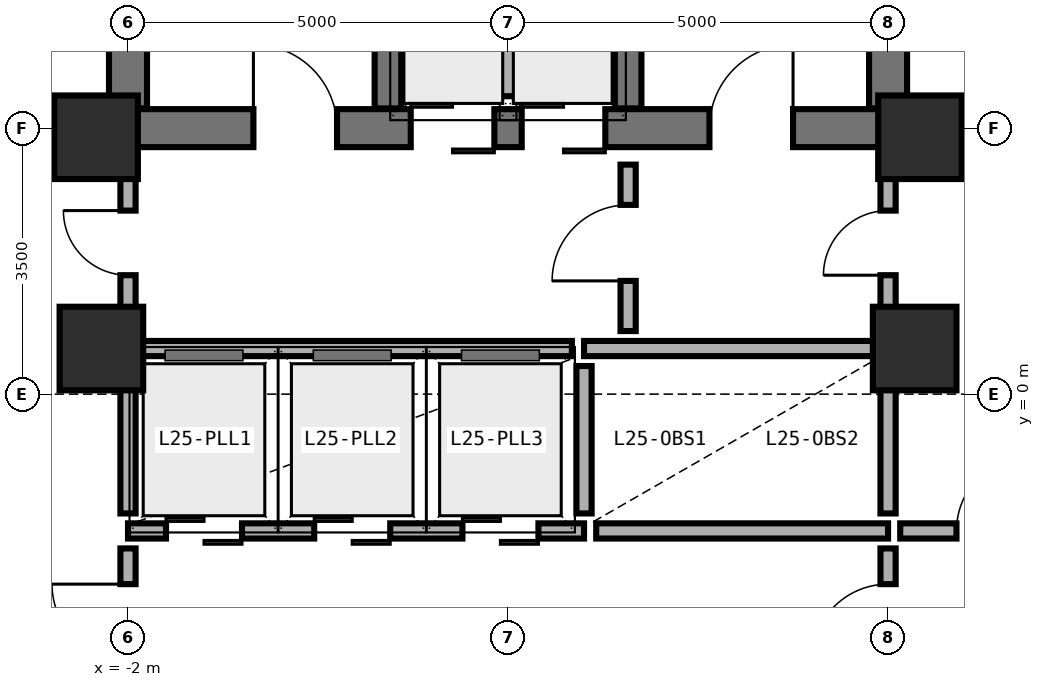
"""IFC4 building model, lengths in metres.
Left out: names, types, materials, properties, quantities, classifications, styles, units other than length and angle.
Written with IfcOpenShell. Run it as: python <this file> out.ifc"""

import sys

from ifc_helpers import new_model, si_unit, direction, frame, frame_2d, origin, origin_2d, place, context, subcontext, project, spatial, rectangle, extrude, element, fill, save


model = new_model("IFC4")
c1 = context("Model", 3, precision=1e-05, world=origin(), true_north=direction((0.0, 1.0)))
c2 = subcontext(c1, "Body", "Model", "MODEL_VIEW")
j1 = project(units=[si_unit("LENGTHUNIT", "METRE"), si_unit("PLANEANGLEUNIT", "RADIAN")], contexts=[c1])
p1 = place(None, origin())
s1 = spatial("IfcSite", under=j1, at=p1, CompositionType="ELEMENT")
p2 = place(p1, origin())
s2 = spatial("IfcBuilding", under=s1, at=p2, CompositionType="ELEMENT")
p3 = place(p2, frame((0.0, 0.0, 103.2)))
s3 = spatial("IfcBuildingStorey", under=s2, at=p3, CompositionType="ELEMENT", Elevation=103.2)
p4 = place(p3, frame((-2.0, 3.5, 0.0), z_axis=(0.0, 0.0, 1.0), x_axis=(1.0, 0.0, 0.0)))
e1 = element("IfcWall", 1, at=p4, inside=s3, PredefinedType="SHEAR", context=c2, shape_type="SweptSolid", body=[
    extrude(rectangle(XDim=10.0, YDim=0.5, at=frame_2d((5.0, 0.0))), origin(), (0.0, 0.0, 1.0), 3.892),
])
p5 = place(p4, frame((1.65, 0.0, 0.0)))
e2 = element("IfcOpeningElement", 2, at=p5, cuts=e1, PredefinedType="OPENING", context=c2, shape_type="SweptSolid", body=[
    extrude(rectangle(XDim=1.1, YDim=2.15, at=frame_2d((0.55, 1.075))), frame((0.0, 0.26, 0.0), z_axis=(0.0, -1.0, 0.0), x_axis=(1.0, 0.0, 0.0)), (0.0, 0.0, 1.0), 0.52),
])
p6 = place(p4, frame((7.65, 0.0, 0.0)))
e3 = element("IfcOpeningElement", 3, at=p6, cuts=e1, PredefinedType="OPENING", context=c2, shape_type="SweptSolid", body=[
    extrude(rectangle(XDim=1.1, YDim=2.15, at=frame_2d((0.55, 1.075))), frame((0.0, 0.26, 0.0), z_axis=(0.0, -1.0, 0.0), x_axis=(1.0, 0.0, 0.0)), (0.0, 0.0, 1.0), 0.52),
])
p7 = place(p4, frame((3.72, 0.0, 0.0)))
e4 = element("IfcOpeningElement", 4, at=p7, cuts=e1, PredefinedType="OPENING", context=c2, shape_type="SweptSolid", body=[
    extrude(rectangle(XDim=1.1, YDim=2.2, at=frame_2d((0.55, 1.1))), frame((0.0, 0.26, 0.0), z_axis=(0.0, -1.0, 0.0), x_axis=(1.0, 0.0, 0.0)), (0.0, 0.0, 1.0), 0.52),
])
p8 = place(p4, frame((5.18, 0.0, 0.0)))
e5 = element("IfcOpeningElement", 5, at=p8, cuts=e1, PredefinedType="OPENING", context=c2, shape_type="SweptSolid", body=[
    extrude(rectangle(XDim=1.1, YDim=2.2, at=frame_2d((0.55, 1.1))), frame((0.0, 0.26, 0.0), z_axis=(0.0, -1.0, 0.0), x_axis=(1.0, 0.0, 0.0)), (0.0, 0.0, 1.0), 0.52),
])
for number, where, z_axis, x_axis in (
    (6, (-2.0, 3.76, 0.0), (0.0, 0.0, 1.0), (0.0, 1.0, 0.0)),
    (7, (8.0, 3.76, 0.0), (0.0, 0.0, 1.0), (0.0, 1.0, 0.0)),
):
    element("IfcWall", number, at=place(p3, frame(where, z_axis=z_axis, x_axis=x_axis)), inside=s3, PredefinedType="SHEAR", context=c2, shape_type="SweptSolid", body=[
        extrude(rectangle(XDim=8.48, YDim=0.5, at=frame_2d((4.24, 0.0))), origin(), (0.0, 0.0, 1.0), 3.892),
    ])
for number, where, z_axis, x_axis in (
    (8, (1.42, 3.76, 0.0), (0.0, 0.0, 1.0), (0.0, 1.0, 0.0)),
    (9, (4.58, 3.76, 0.0), (0.0, 0.0, 1.0), (0.0, 1.0, 0.0)),
):
    element("IfcWall", number, at=place(p3, frame(where, z_axis=z_axis, x_axis=x_axis)), inside=s3, PredefinedType="SHEAR", context=c2, shape_type="SweptSolid", body=[
        extrude(rectangle(XDim=8.48, YDim=0.35, at=frame_2d((4.24, 0.0))), origin(), (0.0, 0.0, 1.0), 3.892),
    ])
for number, where, z_axis, x_axis in (
    (10, (-2.42, 3.38, 0.0), (0.0, 0.0, 1.0), (1.0, 0.0, 0.0)),
    (11, (8.42, 3.38, 0.0), (0.0, 0.0, 1.0), (1.0, 0.0, 0.0)),
    (12, (-2.35, 0.6, 0.0), (0.0, 0.0, 1.0), (1.0, 0.0, 0.0)),
    (13, (8.35, 0.6, 0.0), (0.0, 0.0, 1.0), (1.0, 0.0, 0.0)),
):
    element("IfcColumn", number, at=place(p3, frame(where, z_axis=z_axis, x_axis=x_axis)), inside=s3, PredefinedType="COLUMN", context=c2, shape_type="SweptSolid", body=[
        extrude(rectangle(XDim=1.1, YDim=1.1, at=origin_2d()), origin(), (0.0, 0.0, 1.0), 3.875),
    ])
p9 = place(p3, frame((3.0, 3.92, 0.0), z_axis=(0.0, 0.0, 1.0), x_axis=(0.0, 1.0, 0.0)))
e14 = element("IfcWall", 14, at=p9, inside=s3, PredefinedType="SOLIDWALL", context=c2, shape_type="SweptSolid", body=[
    extrude(rectangle(XDim=2.03, YDim=0.2, at=frame_2d((1.015, 0.0))), origin(), (0.0, 0.0, 1.0), 3.64),
])
p10 = place(p3, frame((4.0, 0.6, 0.0), z_axis=(0.0, 0.0, 1.0), x_axis=(1.0, 0.0, 0.0)))
e15 = element("IfcWall", 15, at=p10, inside=s3, PredefinedType="SOLIDWALL", context=c2, shape_type="SweptSolid", body=[
    extrude(rectangle(XDim=3.88, YDim=0.2, at=frame_2d((1.94, 0.0))), origin(), (0.0, 0.0, 1.0), 3.172),
])
p11 = place(p3, frame((-2.0, -1.8, 0.0), z_axis=(0.0, 0.0, 1.0), x_axis=(1.0, 0.0, 0.0)))
e16 = element("IfcWall", 16, at=p11, inside=s3, PredefinedType="SOLIDWALL", context=c2, shape_type="SweptSolid", body=[
    extrude(rectangle(XDim=6.0, YDim=0.2, at=frame_2d((3.0, 0.0))), origin(), (0.0, 0.0, 1.0), 3.64),
])
p12 = place(p11, frame((0.5, 0.0, 0.0)))
e17 = element("IfcOpeningElement", 17, at=p12, cuts=e16, PredefinedType="OPENING", context=c2, shape_type="SweptSolid", body=[
    extrude(rectangle(XDim=1.0, YDim=2.2, at=frame_2d((0.5, 1.1))), frame((0.0, 0.11, 0.0), z_axis=(0.0, -1.0, 0.0), x_axis=(1.0, 0.0, 0.0)), (0.0, 0.0, 1.0), 0.22),
])
p13 = place(p11, frame((2.45, 0.0, 0.0)))
e18 = element("IfcOpeningElement", 18, at=p13, cuts=e16, PredefinedType="OPENING", context=c2, shape_type="SweptSolid", body=[
    extrude(rectangle(XDim=1.0, YDim=2.2, at=frame_2d((0.5, 1.1))), frame((0.0, 0.11, 0.0), z_axis=(0.0, -1.0, 0.0), x_axis=(1.0, 0.0, 0.0)), (0.0, 0.0, 1.0), 0.22),
])
p14 = place(p11, frame((4.4, 0.0, 0.0)))
e19 = element("IfcOpeningElement", 19, at=p14, cuts=e16, PredefinedType="OPENING", context=c2, shape_type="SweptSolid", body=[
    extrude(rectangle(XDim=1.0, YDim=2.2, at=frame_2d((0.5, 1.1))), frame((0.0, 0.11, 0.0), z_axis=(0.0, -1.0, 0.0), x_axis=(1.0, 0.0, 0.0)), (0.0, 0.0, 1.0), 0.22),
])
p15 = place(p3, frame((-2.0, -1.57, 0.0), z_axis=(0.0, 0.0, 1.0), x_axis=(0.0, 1.0, 0.0)))
e20 = element("IfcWall", 20, at=p15, inside=s3, PredefinedType="SOLIDWALL", context=c2, shape_type="SweptSolid", body=[
    extrude(rectangle(XDim=2.05, YDim=0.2, at=frame_2d((1.025, 0.0))), origin(), (0.0, 0.0, 1.0), 3.022),
])
p16 = place(p3, frame((4.16, -1.8, 0.0), z_axis=(0.0, 0.0, 1.0), x_axis=(1.0, 0.0, 0.0)))
e21 = element("IfcWall", 21, at=p16, inside=s3, PredefinedType="SOLIDWALL", context=c2, shape_type="SweptSolid", body=[
    extrude(rectangle(XDim=3.84, YDim=0.2, at=frame_2d((1.92, 0.0))), origin(), (0.0, 0.0, 1.0), 3.64),
])
p17 = place(p3, frame((4.0, -1.57, 0.0), z_axis=(0.0, 0.0, 1.0), x_axis=(0.0, 1.0, 0.0)))
e22 = element("IfcWall", 22, at=p17, inside=s3, PredefinedType="SOLIDWALL", context=c2, shape_type="SweptSolid", body=[
    extrude(rectangle(XDim=1.94, YDim=0.2, at=frame_2d((0.97, 0.0))), origin(), (0.0, 0.0, 1.0), 3.64),
])
p18 = place(p3, frame((8.0, -1.57, 0.0), z_axis=(0.0, 0.0, 1.0), x_axis=(0.0, 1.0, 0.0)))
e23 = element("IfcWall", 23, at=p18, inside=s3, PredefinedType="SOLIDWALL", context=c2, shape_type="SweptSolid", body=[
    extrude(rectangle(XDim=2.05, YDim=0.2, at=frame_2d((1.025, 0.0))), origin(), (0.0, 0.0, 1.0), 3.072),
])
p19 = place(p3, frame((4.58, 0.83, 0.0), z_axis=(0.0, 0.0, 1.0), x_axis=(0.0, 1.0, 0.0)))
e24 = element("IfcWall", 24, at=p19, inside=s3, PredefinedType="MOVABLE", context=c2, shape_type="SweptSolid", body=[
    extrude(rectangle(XDim=2.19, YDim=0.2, at=frame_2d((1.095, 0.0))), origin(), (0.0, 0.0, 1.0), 3.64),
])
p20 = place(p19, frame((0.66, 0.0, 0.0)))
e25 = element("IfcOpeningElement", 25, at=p20, cuts=e24, PredefinedType="OPENING", context=c2, shape_type="SweptSolid", body=[
    extrude(rectangle(XDim=1.0, YDim=2.1, at=frame_2d((0.5, 1.05))), frame((0.0, 0.11, 0.0), z_axis=(0.0, -1.0, 0.0), x_axis=(1.0, 0.0, 0.0)), (0.0, 0.0, 1.0), 0.22),
])
p21 = place(p3, frame((-2.0, 0.72, 0.0), z_axis=(0.0, 0.0, 1.0), x_axis=(0.0, 1.0, 0.0)))
e26 = element("IfcWall", 26, at=p21, inside=s3, PredefinedType="MOVABLE", context=c2, shape_type="SweptSolid", body=[
    extrude(rectangle(XDim=2.3, YDim=0.2, at=frame_2d((1.15, 0.0))), origin(), (0.0, 0.0, 1.0), 2.872),
])
p22 = place(p21, frame((0.845, 0.0, 0.0)))
e27 = element("IfcOpeningElement", 27, at=p22, cuts=e26, PredefinedType="OPENING", context=c2, shape_type="SweptSolid", body=[
    extrude(rectangle(XDim=0.85, YDim=2.1, at=frame_2d((0.425, 1.05))), frame((0.0, 0.11, 0.0), z_axis=(0.0, -1.0, 0.0), x_axis=(1.0, 0.0, 0.0)), (0.0, 0.0, 1.0), 0.22),
])
p23 = place(p3, frame((8.0, 0.72, 0.0), z_axis=(0.0, 0.0, 1.0), x_axis=(0.0, 1.0, 0.0)))
e28 = element("IfcWall", 28, at=p23, inside=s3, PredefinedType="MOVABLE", context=c2, shape_type="SweptSolid", body=[
    extrude(rectangle(XDim=2.3, YDim=0.2, at=frame_2d((1.15, 0.0))), origin(), (0.0, 0.0, 1.0), 2.872),
])
p24 = place(p23, frame((0.845, 0.0, 0.0)))
e29 = element("IfcOpeningElement", 29, at=p24, cuts=e28, PredefinedType="OPENING", context=c2, shape_type="SweptSolid", body=[
    extrude(rectangle(XDim=0.85, YDim=2.1, at=frame_2d((0.425, 1.05))), frame((0.0, 0.11, 0.0), z_axis=(0.0, -1.0, 0.0), x_axis=(1.0, 0.0, 0.0)), (0.0, 0.0, 1.0), 0.22),
])
p25 = place(p3, frame((-2.0, -3.97, 0.0), z_axis=(0.0, 0.0, 1.0), x_axis=(0.0, 1.0, 0.0)))
e30 = element("IfcWall", 30, at=p25, inside=s3, PredefinedType="MOVABLE", context=c2, shape_type="SweptSolid", body=[
    extrude(rectangle(XDim=1.94, YDim=0.2, at=frame_2d((0.97, 0.0))), origin(), (0.0, 0.0, 1.0), 3.022),
])
p26 = place(p25, frame((0.47, 0.0, 0.0)))
e31 = element("IfcOpeningElement", 31, at=p26, cuts=e30, PredefinedType="OPENING", context=c2, shape_type="SweptSolid", body=[
    extrude(rectangle(XDim=1.0, YDim=2.1, at=frame_2d((0.5, 1.05))), frame((0.0, 0.11, 0.0), z_axis=(0.0, -1.0, 0.0), x_axis=(1.0, 0.0, 0.0)), (0.0, 0.0, 1.0), 0.22),
])
p27 = place(p3, frame((8.0, -3.97, 0.0), z_axis=(0.0, 0.0, 1.0), x_axis=(0.0, 1.0, 0.0)))
e32 = element("IfcWall", 32, at=p27, inside=s3, PredefinedType="MOVABLE", context=c2, shape_type="SweptSolid", body=[
    extrude(rectangle(XDim=1.94, YDim=0.2, at=frame_2d((0.97, 0.0))), origin(), (0.0, 0.0, 1.0), 3.072),
])
p28 = place(p27, frame((0.47, 0.0, 0.0)))
e33 = element("IfcOpeningElement", 33, at=p28, cuts=e32, PredefinedType="OPENING", context=c2, shape_type="SweptSolid", body=[
    extrude(rectangle(XDim=1.0, YDim=2.1, at=frame_2d((0.5, 1.05))), frame((0.0, 0.11, 0.0), z_axis=(0.0, -1.0, 0.0), x_axis=(1.0, 0.0, 0.0)), (0.0, 0.0, 1.0), 0.22),
])
p29 = place(p3, frame((8.16, -1.8, 0.0), z_axis=(0.0, 0.0, 1.0), x_axis=(1.0, 0.0, 0.0)))
e34 = element("IfcWall", 34, at=p29, inside=s3, PredefinedType="MOVABLE", context=c2, shape_type="SweptSolid", body=[
    extrude(rectangle(XDim=2.64, YDim=0.2, at=frame_2d((1.32, 0.0))), origin(), (0.0, 0.0, 1.0), 3.64),
])
p30 = place(p29, frame((0.74, 0.0, 0.0)))
e35 = element("IfcOpeningElement", 35, at=p30, cuts=e34, PredefinedType="OPENING", context=c2, shape_type="SweptSolid", body=[
    extrude(rectangle(XDim=1.0, YDim=2.1, at=frame_2d((0.5, 1.05))), frame((0.0, 0.11, 0.0), z_axis=(0.0, -1.0, 0.0), x_axis=(1.0, 0.0, 0.0)), (0.0, 0.0, 1.0), 0.22),
])
p31 = place(p3, frame((-1.88, 0.6, 0.0), z_axis=(0.0, 0.0, 1.0), x_axis=(1.0, 0.0, 0.0)))
e36 = element("IfcWall", 36, at=p31, inside=s3, PredefinedType="MOVABLE", context=c2, shape_type="SweptSolid", body=[
    extrude(rectangle(XDim=5.72, YDim=0.2, at=frame_2d((2.86, 0.0))), origin(), (0.0, 0.0, 1.0), 3.172),
])
p32 = place(p5, origin())
e37 = element("IfcDoor", 37, at=p32, inside=s3, OperationType="SINGLE_SWING_LEFT", PredefinedType="DOOR", context=c2, shape_type="SweptSolid", body=[
    extrude(rectangle(XDim=1.1, YDim=2.15, at=frame_2d((0.55, 1.075))), frame((0.0, 0.025, 0.0), z_axis=(0.0, -1.0, 0.0), x_axis=(1.0, 0.0, 0.0)), (0.0, 0.0, 1.0), 0.05),
])
fill(e2, e37)
p33 = place(p6, origin())
e38 = element("IfcDoor", 38, at=p33, inside=s3, OperationType="SINGLE_SWING_RIGHT", PredefinedType="DOOR", context=c2, shape_type="SweptSolid", body=[
    extrude(rectangle(XDim=1.1, YDim=2.15, at=frame_2d((0.55, 1.075))), frame((0.0, 0.025, 0.0), z_axis=(0.0, -1.0, 0.0), x_axis=(1.0, 0.0, 0.0)), (0.0, 0.0, 1.0), 0.05),
])
fill(e3, e38)
p34 = place(p7, origin())
e39 = element("IfcDoor", 39, at=p34, inside=s3, OperationType="DOUBLE_DOOR_SLIDING", PredefinedType="DOOR", context=c2, shape_type="SweptSolid", body=[
    extrude(rectangle(XDim=1.1, YDim=2.2, at=frame_2d((0.55, 1.1))), frame((0.0, 0.025, 0.0), z_axis=(0.0, -1.0, 0.0), x_axis=(1.0, 0.0, 0.0)), (0.0, 0.0, 1.0), 0.05),
])
fill(e4, e39)
p35 = place(p8, origin())
e40 = element("IfcDoor", 40, at=p35, inside=s3, OperationType="DOUBLE_DOOR_SLIDING", PredefinedType="DOOR", context=c2, shape_type="SweptSolid", body=[
    extrude(rectangle(XDim=1.1, YDim=2.2, at=frame_2d((0.55, 1.1))), frame((0.0, 0.025, 0.0), z_axis=(0.0, -1.0, 0.0), x_axis=(1.0, 0.0, 0.0)), (0.0, 0.0, 1.0), 0.05),
])
fill(e5, e40)
p36 = place(p20, origin())
e41 = element("IfcDoor", 41, at=p36, inside=s3, OperationType="SINGLE_SWING_LEFT", PredefinedType="DOOR", context=c2, shape_type="SweptSolid", body=[
    extrude(rectangle(XDim=1.0, YDim=2.1, at=frame_2d((0.5, 1.05))), frame((0.0, 0.025, 0.0), z_axis=(0.0, -1.0, 0.0), x_axis=(1.0, 0.0, 0.0)), (0.0, 0.0, 1.0), 0.05),
])
fill(e25, e41)
p37 = place(p22, origin())
e42 = element("IfcDoor", 42, at=p37, inside=s3, OperationType="SINGLE_SWING_RIGHT", PredefinedType="DOOR", context=c2, shape_type="SweptSolid", body=[
    extrude(rectangle(XDim=0.85, YDim=2.1, at=frame_2d((0.425, 1.05))), frame((0.0, 0.025, 0.0), z_axis=(0.0, -1.0, 0.0), x_axis=(1.0, 0.0, 0.0)), (0.0, 0.0, 1.0), 0.05),
])
fill(e27, e42)
p38 = place(p24, origin())
e43 = element("IfcDoor", 43, at=p38, inside=s3, OperationType="SINGLE_SWING_LEFT", PredefinedType="DOOR", context=c2, shape_type="SweptSolid", body=[
    extrude(rectangle(XDim=0.85, YDim=2.1, at=frame_2d((0.425, 1.05))), frame((0.0, 0.025, 0.0), z_axis=(0.0, -1.0, 0.0), x_axis=(1.0, 0.0, 0.0)), (0.0, 0.0, 1.0), 0.05),
])
fill(e29, e43)
p39 = place(p26, origin())
e44 = element("IfcDoor", 44, at=p39, inside=s3, OperationType="SINGLE_SWING_RIGHT", PredefinedType="DOOR", context=c2, shape_type="SweptSolid", body=[
    extrude(rectangle(XDim=1.0, YDim=2.1, at=frame_2d((0.5, 1.05))), frame((0.0, 0.025, 0.0), z_axis=(0.0, -1.0, 0.0), x_axis=(1.0, 0.0, 0.0)), (0.0, 0.0, 1.0), 0.05),
])
fill(e31, e44)
p40 = place(p28, origin())
e45 = element("IfcDoor", 45, at=p40, inside=s3, OperationType="SINGLE_SWING_LEFT", PredefinedType="DOOR", context=c2, shape_type="SweptSolid", body=[
    extrude(rectangle(XDim=1.0, YDim=2.1, at=frame_2d((0.5, 1.05))), frame((0.0, 0.025, 0.0), z_axis=(0.0, -1.0, 0.0), x_axis=(1.0, 0.0, 0.0)), (0.0, 0.0, 1.0), 0.05),
])
fill(e33, e45)
p41 = place(p30, origin())
e46 = element("IfcDoor", 46, at=p41, inside=s3, OperationType="SINGLE_SWING_RIGHT", PredefinedType="DOOR", context=c2, shape_type="SweptSolid", body=[
    extrude(rectangle(XDim=1.0, YDim=2.1, at=frame_2d((0.5, 1.05))), frame((0.0, 0.025, 0.0), z_axis=(0.0, -1.0, 0.0), x_axis=(1.0, 0.0, 0.0)), (0.0, 0.0, 1.0), 0.05),
])
fill(e35, e46)
p42 = place(p12, origin())
e47 = element("IfcDoor", 47, at=p42, inside=s3, OperationType="DOUBLE_DOOR_SLIDING", PredefinedType="DOOR", context=c2, shape_type="SweptSolid", body=[
    extrude(rectangle(XDim=1.0, YDim=2.2, at=frame_2d((0.5, 1.1))), frame((0.0, 0.025, 0.0), z_axis=(0.0, -1.0, 0.0), x_axis=(1.0, 0.0, 0.0)), (0.0, 0.0, 1.0), 0.05),
])
fill(e17, e47)
p43 = place(p13, origin())
e48 = element("IfcDoor", 48, at=p43, inside=s3, OperationType="DOUBLE_DOOR_SLIDING", PredefinedType="DOOR", context=c2, shape_type="SweptSolid", body=[
    extrude(rectangle(XDim=1.0, YDim=2.2, at=frame_2d((0.5, 1.1))), frame((0.0, 0.025, 0.0), z_axis=(0.0, -1.0, 0.0), x_axis=(1.0, 0.0, 0.0)), (0.0, 0.0, 1.0), 0.05),
])
fill(e18, e48)
p44 = place(p14, origin())
e49 = element("IfcDoor", 49, at=p44, inside=s3, OperationType="DOUBLE_DOOR_SLIDING", PredefinedType="DOOR", context=c2, shape_type="SweptSolid", body=[
    extrude(rectangle(XDim=1.0, YDim=2.2, at=frame_2d((0.5, 1.1))), frame((0.0, 0.025, 0.0), z_axis=(0.0, -1.0, 0.0), x_axis=(1.0, 0.0, 0.0)), (0.0, 0.0, 1.0), 0.05),
])
fill(e19, e49)
save(model, sys.argv[1])
